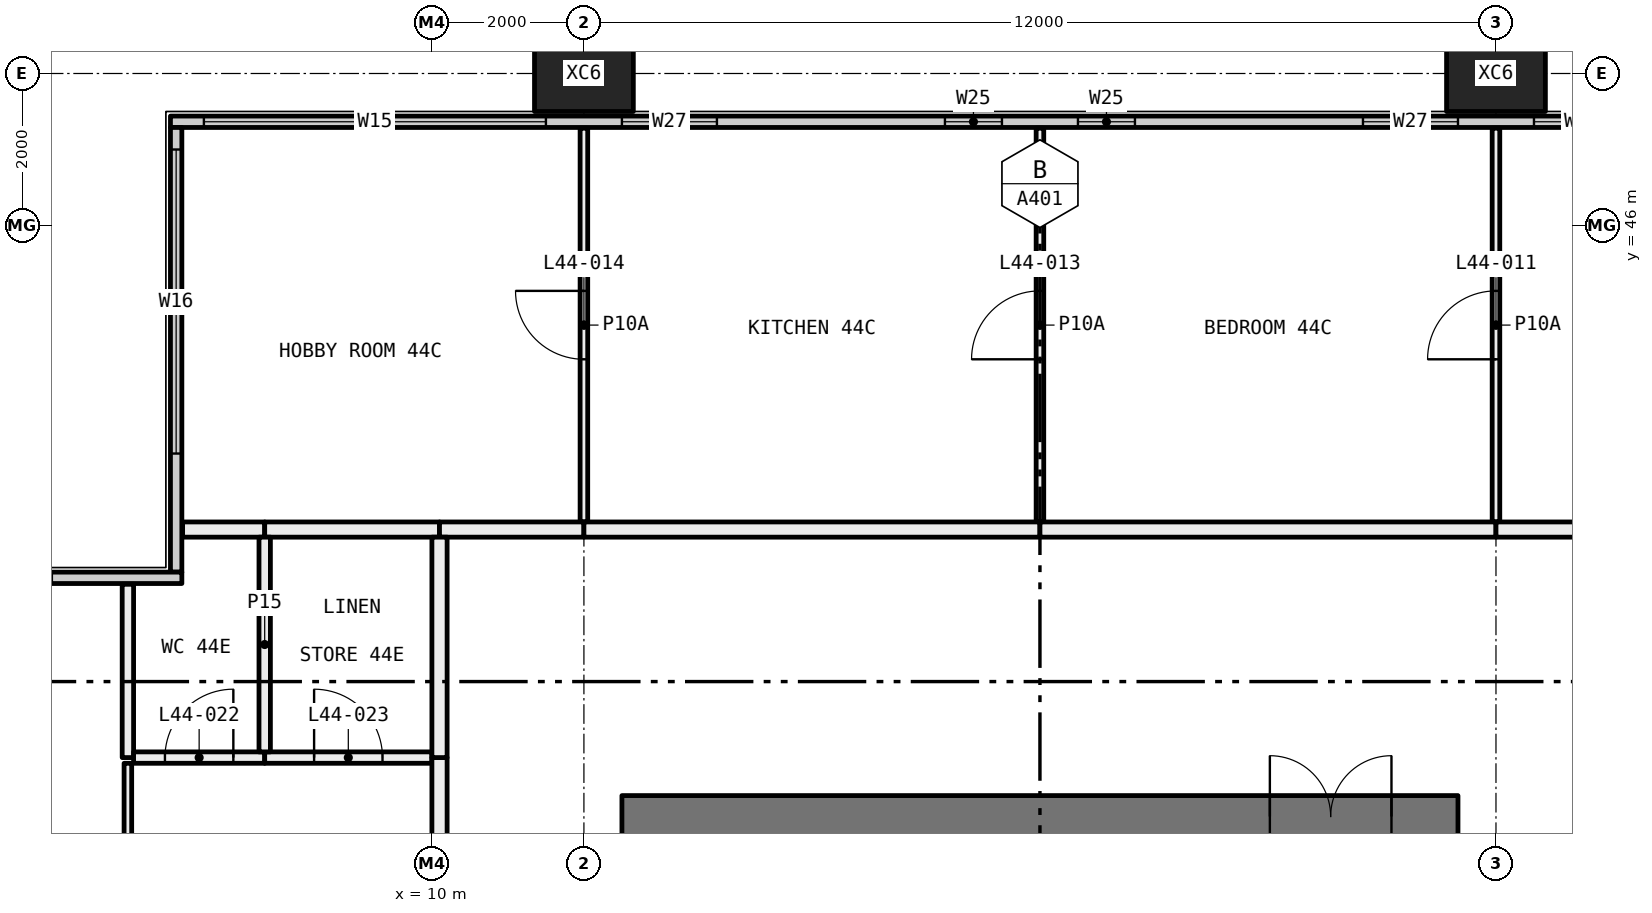
"""IFC4 building model, lengths in metres.
Left out: names, types, materials, properties, quantities, classifications, styles, units other than length and angle.
Written with IfcOpenShell. Run it as: python <this file> out.ifc"""

import sys

from ifc_helpers import new_model, si_unit, direction, frame, frame_2d, origin, origin_2d, place, context, subcontext, project, spatial, rectangle, hollow_rectangle, extrude, element, fill, save


model = new_model("IFC4")
c1 = context("Model", 3, precision=1e-05, world=origin(), true_north=direction((0.0, 1.0)))
c2 = subcontext(c1, "Body", "Model", "MODEL_VIEW")
j1 = project(units=[si_unit("LENGTHUNIT", "METRE"), si_unit("PLANEANGLEUNIT", "RADIAN")], contexts=[c1])
p1 = place(None, origin())
s1 = spatial("IfcSite", under=j1, at=p1, CompositionType="ELEMENT")
p2 = place(p1, origin())
s2 = spatial("IfcBuilding", under=s1, at=p2, CompositionType="ELEMENT")
p3 = place(p2, frame((0.0, 0.0, 168.6)))
s3 = spatial("IfcBuildingStorey", under=s2, at=p3, CompositionType="ELEMENT", Elevation=168.6)
for number, where, z_axis, x_axis in (
    (1, (12.0, 48.0, -0.4), (0.0, 0.0, 1.0), (1.0, 0.0, 0.0)),
    (2, (24.0, 48.0, -0.4), (0.0, 0.0, 1.0), (1.0, 0.0, 0.0)),
):
    element("IfcColumn", number, at=place(p3, frame(where, z_axis=z_axis, x_axis=x_axis)), inside=s3, PredefinedType="COLUMN", context=c2, shape_type="SweptSolid", body=[
        extrude(hollow_rectangle(XDim=1.3, YDim=1.0, WallThickness=0.05, at=origin_2d()), origin(), (0.0, 0.0, 1.0), 3.45),
    ])
p4 = place(p3, frame((6.56, 47.365, 0.0), z_axis=(0.0, 0.0, 1.0), x_axis=(1.0, 0.0, 0.0)))
e3 = element("IfcWall", 3, at=p4, inside=s3, PredefinedType="ELEMENTEDWALL", context=c2, shape_type="SweptSolid", body=[
    extrude(rectangle(XDim=46.88, YDim=0.15, at=frame_2d((23.44, 0.0))), origin(), (0.0, 0.0, 1.0), 3.05),
])
p5 = place(p4, frame((0.44, 0.0, 0.45)))
e4 = element("IfcOpeningElement", 4, at=p5, cuts=e3, PredefinedType="OPENING", context=c2, shape_type="SweptSolid", body=[
    extrude(rectangle(XDim=4.5, YDim=2.55, at=frame_2d((2.25, 1.275))), frame((0.0, 0.085, 0.0), z_axis=(0.0, -1.0, 0.0), x_axis=(1.0, 0.0, 0.0)), (0.0, 0.0, 1.0), 0.17),
])
p6 = place(p4, frame((5.94, 0.0, 0.45)))
e5 = element("IfcOpeningElement", 5, at=p6, cuts=e3, PredefinedType="OPENING", context=c2, shape_type="SweptSolid", body=[
    extrude(rectangle(XDim=1.25, YDim=2.55, at=frame_2d((0.625, 1.275))), frame((0.0, 0.085, 0.0), z_axis=(0.0, -1.0, 0.0), x_axis=(1.0, 0.0, 0.0)), (0.0, 0.0, 1.0), 0.17),
])
p7 = place(p4, frame((10.19, 0.0, 0.45)))
e6 = element("IfcOpeningElement", 6, at=p7, cuts=e3, PredefinedType="OPENING", context=c2, shape_type="SweptSolid", body=[
    extrude(rectangle(XDim=0.75, YDim=2.55, at=frame_2d((0.375, 1.275))), frame((0.0, 0.085, 0.0), z_axis=(0.0, -1.0, 0.0), x_axis=(1.0, 0.0, 0.0)), (0.0, 0.0, 1.0), 0.17),
])
p8 = place(p4, frame((11.94, 0.0, 0.45)))
e7 = element("IfcOpeningElement", 7, at=p8, cuts=e3, PredefinedType="OPENING", context=c2, shape_type="SweptSolid", body=[
    extrude(rectangle(XDim=0.75, YDim=2.55, at=frame_2d((0.375, 1.275))), frame((0.0, 0.085, 0.0), z_axis=(0.0, -1.0, 0.0), x_axis=(1.0, 0.0, 0.0)), (0.0, 0.0, 1.0), 0.17),
])
p9 = place(p4, frame((15.69, 0.0, 0.45)))
e8 = element("IfcOpeningElement", 8, at=p9, cuts=e3, PredefinedType="OPENING", context=c2, shape_type="SweptSolid", body=[
    extrude(rectangle(XDim=1.25, YDim=2.55, at=frame_2d((0.625, 1.275))), frame((0.0, 0.085, 0.0), z_axis=(0.0, -1.0, 0.0), x_axis=(1.0, 0.0, 0.0)), (0.0, 0.0, 1.0), 0.17),
])
p10 = place(p4, frame((17.94, 0.0, 0.45)))
e9 = element("IfcOpeningElement", 9, at=p10, cuts=e3, PredefinedType="OPENING", context=c2, shape_type="SweptSolid", body=[
    extrude(rectangle(XDim=1.25, YDim=2.55, at=frame_2d((0.625, 1.275))), frame((0.0, 0.085, 0.0), z_axis=(0.0, -1.0, 0.0), x_axis=(1.0, 0.0, 0.0)), (0.0, 0.0, 1.0), 0.17),
])
p11 = place(p4, frame((22.19, 0.0, 0.45)))
e10 = element("IfcOpeningElement", 10, at=p11, cuts=e3, PredefinedType="OPENING", context=c2, shape_type="SweptSolid", body=[
    extrude(rectangle(XDim=0.75, YDim=2.55, at=frame_2d((0.375, 1.275))), frame((0.0, 0.085, 0.0), z_axis=(0.0, -1.0, 0.0), x_axis=(1.0, 0.0, 0.0)), (0.0, 0.0, 1.0), 0.17),
])
p12 = place(p4, frame((23.94, 0.0, 0.45)))
e11 = element("IfcOpeningElement", 11, at=p12, cuts=e3, PredefinedType="OPENING", context=c2, shape_type="SweptSolid", body=[
    extrude(rectangle(XDim=0.75, YDim=2.55, at=frame_2d((0.375, 1.275))), frame((0.0, 0.085, 0.0), z_axis=(0.0, -1.0, 0.0), x_axis=(1.0, 0.0, 0.0)), (0.0, 0.0, 1.0), 0.17),
])
p13 = place(p4, frame((27.69, 0.0, 0.45)))
e12 = element("IfcOpeningElement", 12, at=p13, cuts=e3, PredefinedType="OPENING", context=c2, shape_type="SweptSolid", body=[
    extrude(rectangle(XDim=1.25, YDim=2.55, at=frame_2d((0.625, 1.275))), frame((0.0, 0.085, 0.0), z_axis=(0.0, -1.0, 0.0), x_axis=(1.0, 0.0, 0.0)), (0.0, 0.0, 1.0), 0.17),
])
p14 = place(p4, frame((29.94, 0.0, 0.45)))
e13 = element("IfcOpeningElement", 13, at=p14, cuts=e3, PredefinedType="OPENING", context=c2, shape_type="SweptSolid", body=[
    extrude(rectangle(XDim=1.25, YDim=2.55, at=frame_2d((0.625, 1.275))), frame((0.0, 0.085, 0.0), z_axis=(0.0, -1.0, 0.0), x_axis=(1.0, 0.0, 0.0)), (0.0, 0.0, 1.0), 0.17),
])
p15 = place(p4, frame((34.19, 0.0, 0.45)))
e14 = element("IfcOpeningElement", 14, at=p15, cuts=e3, PredefinedType="OPENING", context=c2, shape_type="SweptSolid", body=[
    extrude(rectangle(XDim=0.75, YDim=2.55, at=frame_2d((0.375, 1.275))), frame((0.0, 0.085, 0.0), z_axis=(0.0, -1.0, 0.0), x_axis=(1.0, 0.0, 0.0)), (0.0, 0.0, 1.0), 0.17),
])
p16 = place(p4, frame((35.94, 0.0, 0.45)))
e15 = element("IfcOpeningElement", 15, at=p16, cuts=e3, PredefinedType="OPENING", context=c2, shape_type="SweptSolid", body=[
    extrude(rectangle(XDim=0.75, YDim=2.55, at=frame_2d((0.375, 1.275))), frame((0.0, 0.085, 0.0), z_axis=(0.0, -1.0, 0.0), x_axis=(1.0, 0.0, 0.0)), (0.0, 0.0, 1.0), 0.17),
])
p17 = place(p4, frame((39.69, 0.0, 0.45)))
e16 = element("IfcOpeningElement", 16, at=p17, cuts=e3, PredefinedType="OPENING", context=c2, shape_type="SweptSolid", body=[
    extrude(rectangle(XDim=1.25, YDim=2.55, at=frame_2d((0.625, 1.275))), frame((0.0, 0.085, 0.0), z_axis=(0.0, -1.0, 0.0), x_axis=(1.0, 0.0, 0.0)), (0.0, 0.0, 1.0), 0.17),
])
p18 = place(p4, frame((41.94, 0.0, 0.45)))
e17 = element("IfcOpeningElement", 17, at=p18, cuts=e3, PredefinedType="OPENING", context=c2, shape_type="SweptSolid", body=[
    extrude(rectangle(XDim=4.5, YDim=2.55, at=frame_2d((2.25, 1.275))), frame((0.0, 0.085, 0.0), z_axis=(0.0, -1.0, 0.0), x_axis=(1.0, 0.0, 0.0)), (0.0, 0.0, 1.0), 0.17),
])
p19 = place(p3, frame((6.635, 41.44, 0.0), z_axis=(0.0, 0.0, 1.0), x_axis=(0.0, 1.0, 0.0)))
e18 = element("IfcWall", 18, at=p19, inside=s3, PredefinedType="ELEMENTEDWALL", context=c2, shape_type="SweptSolid", body=[
    extrude(rectangle(XDim=5.85, YDim=0.15, at=frame_2d((2.925, 0.0))), origin(), (0.0, 0.0, 1.0), 3.05),
])
p20 = place(p19, frame((1.56, 0.0, 0.45)))
e19 = element("IfcOpeningElement", 19, at=p20, cuts=e18, PredefinedType="OPENING", context=c2, shape_type="SweptSolid", body=[
    extrude(rectangle(XDim=4.0, YDim=2.55, at=frame_2d((2.0, 1.275))), frame((0.0, 0.085, 0.0), z_axis=(0.0, -1.0, 0.0), x_axis=(1.0, 0.0, 0.0)), (0.0, 0.0, 1.0), 0.17),
])
p21 = place(p3, frame((0.56, 41.365, 0.0), z_axis=(0.0, 0.0, 1.0), x_axis=(1.0, 0.0, 0.0)))
e20 = element("IfcWall", 20, at=p21, inside=s3, PredefinedType="ELEMENTEDWALL", context=c2, shape_type="SweptSolid", body=[
    extrude(rectangle(XDim=6.15, YDim=0.15, at=frame_2d((3.075, 0.0))), origin(), (0.0, 0.0, 1.0), 3.05),
])
p22 = place(p21, frame((0.44, 0.0, 0.45)))
e21 = element("IfcOpeningElement", 21, at=p22, cuts=e20, PredefinedType="OPENING", context=c2, shape_type="SweptSolid", body=[
    extrude(rectangle(XDim=4.0, YDim=2.55, at=frame_2d((2.0, 1.275))), frame((0.0, 0.085, 0.0), z_axis=(0.0, -1.0, 0.0), x_axis=(1.0, 0.0, 0.0)), (0.0, 0.0, 1.0), 0.17),
])
p23 = place(p3, frame((12.0, 42.1, 0.0), z_axis=(0.0, 0.0, 1.0), x_axis=(0.0, 1.0, 0.0)))
e22 = element("IfcWall", 22, at=p23, inside=s3, PredefinedType="PARTITIONING", context=c2, shape_type="SweptSolid", body=[
    extrude(rectangle(XDim=5.18, YDim=0.1, at=frame_2d((2.59, 0.0))), origin(), (0.0, 0.0, 1.0), 3.05),
])
p24 = place(p23, frame((2.14, 0.0, 0.0)))
e23 = element("IfcOpeningElement", 23, at=p24, cuts=e22, PredefinedType="OPENING", context=c2, shape_type="SweptSolid", body=[
    extrude(rectangle(XDim=0.9, YDim=2.1, at=frame_2d((0.45, 1.05))), frame((0.0, 0.06, 0.0), z_axis=(0.0, -1.0, 0.0), x_axis=(1.0, 0.0, 0.0)), (0.0, 0.0, 1.0), 0.12),
])
p25 = place(p3, frame((6.72, 42.0, 0.0), z_axis=(0.0, 0.0, 1.0), x_axis=(1.0, 0.0, 0.0)))
e24 = element("IfcWall", 24, at=p25, inside=s3, PredefinedType="PARTITIONING", context=c2, shape_type="SweptSolid", body=[
    extrude(rectangle(XDim=1.08, YDim=0.2, at=frame_2d((0.54, 0.0))), origin(), (0.0, 0.0, 1.0), 3.05),
])
p26 = place(p3, frame((7.8, 42.0, 0.0), z_axis=(0.0, 0.0, 1.0), x_axis=(1.0, 0.0, 0.0)))
e25 = element("IfcWall", 25, at=p26, inside=s3, PredefinedType="PARTITIONING", context=c2, shape_type="SweptSolid", body=[
    extrude(rectangle(XDim=2.3, YDim=0.2, at=frame_2d((1.15, 0.0))), origin(), (0.0, 0.0, 1.0), 3.05),
])
p27 = place(p3, frame((10.1, 42.0, 0.0), z_axis=(0.0, 0.0, 1.0), x_axis=(1.0, 0.0, 0.0)))
e26 = element("IfcWall", 26, at=p27, inside=s3, PredefinedType="PARTITIONING", context=c2, shape_type="SweptSolid", body=[
    extrude(rectangle(XDim=1.9, YDim=0.2, at=frame_2d((0.95, 0.0))), origin(), (0.0, 0.0, 1.0), 3.05),
])
p28 = place(p3, frame((18.0, 42.1, 0.0), z_axis=(0.0, 0.0, 1.0), x_axis=(0.0, 1.0, 0.0)))
e27 = element("IfcWall", 27, at=p28, inside=s3, PredefinedType="PARTITIONING", context=c2, shape_type="SweptSolid", body=[
    extrude(rectangle(XDim=5.18, YDim=0.1, at=frame_2d((2.59, 0.0))), origin(), (0.0, 0.0, 1.0), 3.05),
])
p29 = place(p28, frame((2.14, 0.0, 0.0)))
e28 = element("IfcOpeningElement", 28, at=p29, cuts=e27, PredefinedType="OPENING", context=c2, shape_type="SweptSolid", body=[
    extrude(rectangle(XDim=0.9, YDim=2.1, at=frame_2d((0.45, 1.05))), frame((0.0, 0.06, 0.0), z_axis=(0.0, -1.0, 0.0), x_axis=(1.0, 0.0, 0.0)), (0.0, 0.0, 1.0), 0.12),
])
p30 = place(p3, frame((12.0, 42.0, 0.0), z_axis=(0.0, 0.0, 1.0), x_axis=(1.0, 0.0, 0.0)))
e29 = element("IfcWall", 29, at=p30, inside=s3, PredefinedType="PARTITIONING", context=c2, shape_type="SweptSolid", body=[
    extrude(rectangle(XDim=6.0, YDim=0.2, at=frame_2d((3.0, 0.0))), origin(), (0.0, 0.0, 1.0), 3.05),
])
p31 = place(p3, frame((24.0, 42.1, 0.0), z_axis=(0.0, 0.0, 1.0), x_axis=(0.0, 1.0, 0.0)))
e30 = element("IfcWall", 30, at=p31, inside=s3, PredefinedType="PARTITIONING", context=c2, shape_type="SweptSolid", body=[
    extrude(rectangle(XDim=5.18, YDim=0.1, at=frame_2d((2.59, 0.0))), origin(), (0.0, 0.0, 1.0), 3.05),
])
p32 = place(p31, frame((2.14, 0.0, 0.0)))
e31 = element("IfcOpeningElement", 31, at=p32, cuts=e30, PredefinedType="OPENING", context=c2, shape_type="SweptSolid", body=[
    extrude(rectangle(XDim=0.9, YDim=2.1, at=frame_2d((0.45, 1.05))), frame((0.0, 0.06, 0.0), z_axis=(0.0, -1.0, 0.0), x_axis=(1.0, 0.0, 0.0)), (0.0, 0.0, 1.0), 0.12),
])
p33 = place(p3, frame((18.0, 42.0, 0.0), z_axis=(0.0, 0.0, 1.0), x_axis=(1.0, 0.0, 0.0)))
e32 = element("IfcWall", 32, at=p33, inside=s3, PredefinedType="PARTITIONING", context=c2, shape_type="SweptSolid", body=[
    extrude(rectangle(XDim=6.0, YDim=0.2, at=frame_2d((3.0, 0.0))), origin(), (0.0, 0.0, 1.0), 3.05),
])
p34 = place(p3, frame((24.0, 42.0, 0.0), z_axis=(0.0, 0.0, 1.0), x_axis=(1.0, 0.0, 0.0)))
e33 = element("IfcWall", 33, at=p34, inside=s3, PredefinedType="PARTITIONING", context=c2, shape_type="SweptSolid", body=[
    extrude(rectangle(XDim=6.0, YDim=0.2, at=frame_2d((3.0, 0.0))), origin(), (0.0, 0.0, 1.0), 3.05),
])
p35 = place(p34, frame((2.5, 0.0, 0.0)))
e34 = element("IfcOpeningElement", 34, at=p35, cuts=e33, PredefinedType="OPENING", context=c2, shape_type="SweptSolid", body=[
    extrude(rectangle(XDim=1.0, YDim=2.1, at=frame_2d((0.5, 1.05))), frame((0.0, 0.11, 0.0), z_axis=(0.0, -1.0, 0.0), x_axis=(1.0, 0.0, 0.0)), (0.0, 0.0, 1.0), 0.22),
])
p36 = place(p3, frame((6.0, 36.05, 0.0), z_axis=(0.0, 0.0, 1.0), x_axis=(0.0, 1.0, 0.0)))
e35 = element("IfcWall", 35, at=p36, inside=s3, PredefinedType="PARTITIONING", context=c2, shape_type="SweptSolid", body=[
    extrude(rectangle(XDim=2.875, YDim=0.1, at=frame_2d((1.438, 0.0))), origin(), (0.0, 0.0, 1.0), 2.45),
])
p37 = place(p3, frame((6.0, 39.0, 0.0), z_axis=(0.0, 0.0, 1.0), x_axis=(0.0, 1.0, 0.0)))
e36 = element("IfcWall", 36, at=p37, inside=s3, PredefinedType="PARTITIONING", context=c2, shape_type="SweptSolid", body=[
    extrude(rectangle(XDim=2.28, YDim=0.15, at=frame_2d((1.14, 0.0))), origin(), (0.0, 0.0, 1.0), 3.05),
])
p38 = place(p3, frame((7.8, 39.0, 0.0), z_axis=(0.0, 0.0, 1.0), x_axis=(-1.0, 0.0, 0.0)))
e37 = element("IfcWall", 37, at=p38, inside=s3, PredefinedType="PARTITIONING", context=c2, shape_type="SweptSolid", body=[
    extrude(rectangle(XDim=1.725, YDim=0.15, at=frame_2d((0.863, 0.0))), origin(), (0.0, 0.0, 1.0), 3.05),
])
p39 = place(p38, frame((0.413, 0.0, 0.0)))
e38 = element("IfcOpeningElement", 38, at=p39, cuts=e37, PredefinedType="OPENING", context=c2, shape_type="SweptSolid", body=[
    extrude(rectangle(XDim=0.9, YDim=2.1, at=frame_2d((0.45, 1.05))), frame((0.0, 0.085, 0.0), z_axis=(0.0, -1.0, 0.0), x_axis=(1.0, 0.0, 0.0)), (0.0, 0.0, 1.0), 0.17),
])
p40 = place(p3, frame((10.0, 39.0, 0.0), z_axis=(0.0, 0.0, 1.0), x_axis=(-1.0, 0.0, 0.0)))
e39 = element("IfcWall", 39, at=p40, inside=s3, PredefinedType="PARTITIONING", context=c2, shape_type="SweptSolid", body=[
    extrude(rectangle(XDim=2.2, YDim=0.15, at=frame_2d((1.1, 0.0))), origin(), (0.0, 0.0, 1.0), 3.05),
])
p41 = place(p40, frame((0.65, 0.0, 0.0)))
e40 = element("IfcOpeningElement", 40, at=p41, cuts=e39, PredefinedType="OPENING", context=c2, shape_type="SweptSolid", body=[
    extrude(rectangle(XDim=0.9, YDim=2.1, at=frame_2d((0.45, 1.05))), frame((0.0, 0.085, 0.0), z_axis=(0.0, -1.0, 0.0), x_axis=(1.0, 0.0, 0.0)), (0.0, 0.0, 1.0), 0.17),
])
p42 = place(p3, frame((10.1, 36.1, 0.0), z_axis=(0.0, 0.0, 1.0), x_axis=(0.0, 1.0, 0.0)))
e41 = element("IfcWall", 41, at=p42, inside=s3, PredefinedType="PARTITIONING", context=c2, shape_type="SweptSolid", body=[
    extrude(rectangle(XDim=2.9, YDim=0.2, at=frame_2d((1.45, 0.0))), origin(), (0.0, 0.0, 1.0), 3.05),
])
p43 = place(p3, frame((7.8, 39.075, 0.0), z_axis=(0.0, 0.0, 1.0), x_axis=(0.0, 1.0, 0.0)))
e42 = element("IfcWall", 42, at=p43, inside=s3, PredefinedType="PARTITIONING", context=c2, shape_type="SweptSolid", body=[
    extrude(rectangle(XDim=2.825, YDim=0.15, at=frame_2d((1.413, 0.0))), origin(), (0.0, 0.0, 1.0), 3.05),
])
p44 = place(p3, frame((10.1, 39.0, 0.0), z_axis=(0.0, 0.0, 1.0), x_axis=(0.0, 1.0, 0.0)))
e43 = element("IfcWall", 43, at=p44, inside=s3, PredefinedType="PARTITIONING", context=c2, shape_type="SweptSolid", body=[
    extrude(rectangle(XDim=2.9, YDim=0.2, at=frame_2d((1.45, 0.0))), origin(), (0.0, 0.0, 1.0), 3.05),
])
p45 = place(p3, frame((12.5, 38.225, 0.0), z_axis=(0.0, 0.0, 1.0), x_axis=(1.0, 0.0, 0.0)))
e44 = element("IfcWall", 44, at=p45, inside=s3, PredefinedType="SHEAR", context=c2, shape_type="SweptSolid", body=[
    extrude(rectangle(XDim=11.0, YDim=0.55, at=frame_2d((5.5, 0.0))), origin(), (0.0, 0.0, 1.0), 3.05),
])
p46 = place(p45, frame((8.525, 0.0, 0.0)))
e45 = element("IfcOpeningElement", 45, at=p46, cuts=e44, PredefinedType="OPENING", context=c2, shape_type="SweptSolid", body=[
    extrude(rectangle(XDim=1.6, YDim=2.1, at=frame_2d((0.8, 1.05))), frame((0.0, 0.285, 0.0), z_axis=(0.0, -1.0, 0.0), x_axis=(1.0, 0.0, 0.0)), (0.0, 0.0, 1.0), 0.57),
])
p47 = place(p5, origin())
e46 = element("IfcWindow", 46, at=p47, inside=s3, PartitioningType="SINGLE_PANEL", PredefinedType="WINDOW", context=c2, shape_type="SweptSolid", body=[
    extrude(rectangle(XDim=4.5, YDim=2.55, at=frame_2d((2.25, 1.275))), frame((0.0, 0.03, 0.0), z_axis=(0.0, -1.0, 0.0), x_axis=(1.0, 0.0, 0.0)), (0.0, 0.0, 1.0), 0.06),
])
fill(e4, e46)
p48 = place(p6, origin())
e47 = element("IfcWindow", 47, at=p48, inside=s3, PartitioningType="SINGLE_PANEL", PredefinedType="WINDOW", context=c2, shape_type="SweptSolid", body=[
    extrude(rectangle(XDim=1.25, YDim=2.55, at=frame_2d((0.625, 1.275))), frame((0.0, 0.03, 0.0), z_axis=(0.0, -1.0, 0.0), x_axis=(1.0, 0.0, 0.0)), (0.0, 0.0, 1.0), 0.06),
])
fill(e5, e47)
p49 = place(p7, origin())
e48 = element("IfcWindow", 48, at=p49, inside=s3, PartitioningType="SINGLE_PANEL", PredefinedType="WINDOW", context=c2, shape_type="SweptSolid", body=[
    extrude(rectangle(XDim=0.75, YDim=2.55, at=frame_2d((0.375, 1.275))), frame((0.0, 0.03, 0.0), z_axis=(0.0, -1.0, 0.0), x_axis=(1.0, 0.0, 0.0)), (0.0, 0.0, 1.0), 0.06),
])
fill(e6, e48)
p50 = place(p8, origin())
e49 = element("IfcWindow", 49, at=p50, inside=s3, PartitioningType="SINGLE_PANEL", PredefinedType="WINDOW", context=c2, shape_type="SweptSolid", body=[
    extrude(rectangle(XDim=0.75, YDim=2.55, at=frame_2d((0.375, 1.275))), frame((0.0, 0.03, 0.0), z_axis=(0.0, -1.0, 0.0), x_axis=(1.0, 0.0, 0.0)), (0.0, 0.0, 1.0), 0.06),
])
fill(e7, e49)
p51 = place(p9, origin())
e50 = element("IfcWindow", 50, at=p51, inside=s3, PartitioningType="SINGLE_PANEL", PredefinedType="WINDOW", context=c2, shape_type="SweptSolid", body=[
    extrude(rectangle(XDim=1.25, YDim=2.55, at=frame_2d((0.625, 1.275))), frame((0.0, 0.03, 0.0), z_axis=(0.0, -1.0, 0.0), x_axis=(1.0, 0.0, 0.0)), (0.0, 0.0, 1.0), 0.06),
])
fill(e8, e50)
p52 = place(p10, origin())
e51 = element("IfcWindow", 51, at=p52, inside=s3, PartitioningType="SINGLE_PANEL", PredefinedType="WINDOW", context=c2, shape_type="SweptSolid", body=[
    extrude(rectangle(XDim=1.25, YDim=2.55, at=frame_2d((0.625, 1.275))), frame((0.0, 0.03, 0.0), z_axis=(0.0, -1.0, 0.0), x_axis=(1.0, 0.0, 0.0)), (0.0, 0.0, 1.0), 0.06),
])
fill(e9, e51)
p53 = place(p20, origin())
e52 = element("IfcWindow", 52, at=p53, inside=s3, PartitioningType="SINGLE_PANEL", PredefinedType="WINDOW", context=c2, shape_type="SweptSolid", body=[
    extrude(rectangle(XDim=4.0, YDim=2.55, at=frame_2d((2.0, 1.275))), frame((0.0, 0.03, 0.0), z_axis=(0.0, -1.0, 0.0), x_axis=(1.0, 0.0, 0.0)), (0.0, 0.0, 1.0), 0.06),
])
fill(e19, e52)
p54 = place(p32, origin())
e53 = element("IfcDoor", 53, at=p54, inside=s3, OperationType="SINGLE_SWING_RIGHT", PredefinedType="DOOR", context=c2, shape_type="SweptSolid", body=[
    extrude(rectangle(XDim=0.9, YDim=2.1, at=frame_2d((0.45, 1.05))), frame((0.0, 0.025, 0.0), z_axis=(0.0, -1.0, 0.0), x_axis=(1.0, 0.0, 0.0)), (0.0, 0.0, 1.0), 0.05),
])
fill(e31, e53)
p55 = place(p29, origin())
e54 = element("IfcDoor", 54, at=p55, inside=s3, OperationType="SINGLE_SWING_RIGHT", PredefinedType="DOOR", context=c2, shape_type="SweptSolid", body=[
    extrude(rectangle(XDim=0.9, YDim=2.1, at=frame_2d((0.45, 1.05))), frame((0.0, 0.025, 0.0), z_axis=(0.0, -1.0, 0.0), x_axis=(1.0, 0.0, 0.0)), (0.0, 0.0, 1.0), 0.05),
])
fill(e28, e54)
p56 = place(p24, origin())
e55 = element("IfcDoor", 55, at=p56, inside=s3, OperationType="SINGLE_SWING_LEFT", PredefinedType="DOOR", context=c2, shape_type="SweptSolid", body=[
    extrude(rectangle(XDim=0.9, YDim=2.1, at=frame_2d((0.45, 1.05))), frame((0.0, 0.025, 0.0), z_axis=(0.0, -1.0, 0.0), x_axis=(1.0, 0.0, 0.0)), (0.0, 0.0, 1.0), 0.05),
])
fill(e23, e55)
p57 = place(p39, frame((0.9, 0.0, 0.0), x_axis=(-1.0, 0.0, 0.0)))
e56 = element("IfcDoor", 56, at=p57, inside=s3, OperationType="SINGLE_SWING_LEFT", PredefinedType="DOOR", context=c2, shape_type="SweptSolid", body=[
    extrude(rectangle(XDim=0.9, YDim=2.1, at=frame_2d((0.45, 1.05))), frame((0.0, 0.025, 0.0), z_axis=(0.0, -1.0, 0.0), x_axis=(1.0, 0.0, 0.0)), (0.0, 0.0, 1.0), 0.05),
])
fill(e38, e56)
p58 = place(p41, frame((0.9, 0.0, 0.0), x_axis=(-1.0, 0.0, 0.0)))
e57 = element("IfcDoor", 57, at=p58, inside=s3, OperationType="SINGLE_SWING_RIGHT", PredefinedType="DOOR", context=c2, shape_type="SweptSolid", body=[
    extrude(rectangle(XDim=0.9, YDim=2.1, at=frame_2d((0.45, 1.05))), frame((0.0, 0.025, 0.0), z_axis=(0.0, -1.0, 0.0), x_axis=(1.0, 0.0, 0.0)), (0.0, 0.0, 1.0), 0.05),
])
fill(e40, e57)
p59 = place(p46, origin())
e58 = element("IfcDoor", 58, at=p59, inside=s3, OperationType="DOUBLE_DOOR_SINGLE_SWING", PredefinedType="DOOR", context=c2, shape_type="SweptSolid", body=[
    extrude(rectangle(XDim=1.6, YDim=2.1, at=frame_2d((0.8, 1.05))), frame((0.0, 0.025, 0.0), z_axis=(0.0, -1.0, 0.0), x_axis=(1.0, 0.0, 0.0)), (0.0, 0.0, 1.0), 0.05),
])
fill(e45, e58)
save(model, sys.argv[1])
